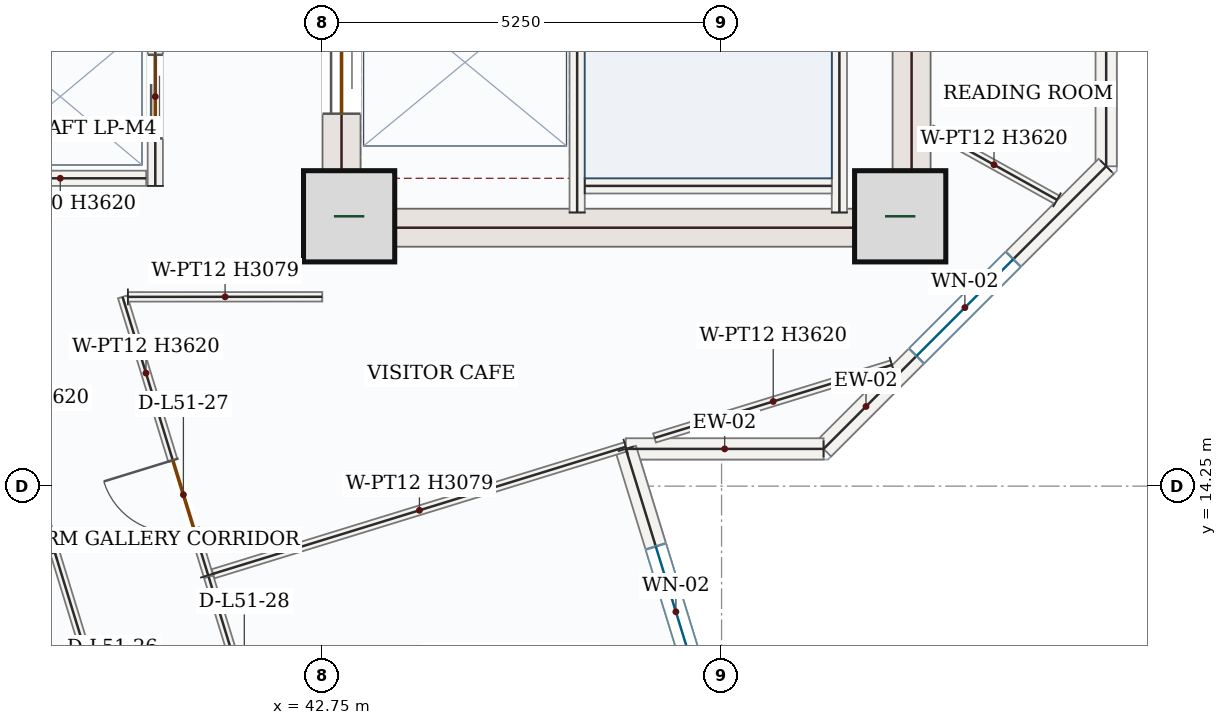
"""IFC4 building model, lengths in metres.
Left out: names, types, materials, properties, quantities, classifications, styles, units other than length and angle.
Written with IfcOpenShell. Run it as: python <this file> out.ifc"""

import sys

from ifc_helpers import new_model, si_unit, direction, frame, frame_2d, origin, origin_2d, place, context, subcontext, project, spatial, rectangle, extrude, source, transform, mapped, element, fill, save


model = new_model("IFC4")
c1 = context("Model", 3, precision=1e-05, world=origin(), true_north=direction((0.0, 1.0)))
c2 = subcontext(c1, "Body", "Model", "MODEL_VIEW")
j1 = project(units=[si_unit("LENGTHUNIT", "METRE"), si_unit("PLANEANGLEUNIT", "RADIAN")], contexts=[c1])
p1 = place(None, origin())
s1 = spatial("IfcSite", under=j1, at=p1, CompositionType="ELEMENT")
p2 = place(p1, origin())
s2 = spatial("IfcBuilding", under=s1, at=p2, CompositionType="ELEMENT")
p3 = place(p2, frame((0.0, 0.0, 217.5)))
s3 = spatial("IfcBuildingStorey", under=s2, at=p3, CompositionType="ELEMENT", Elevation=217.5)
p4 = place(p3, frame((43.0, 17.4, 0.0), z_axis=(0.0, 0.0, 1.0), x_axis=(0.0, 1.0, 0.0)))
e1 = element("IfcWall", 1, at=p4, inside=s3, PredefinedType="SHEAR", context=c2, shape_type="SweptSolid", body=[
    extrude(rectangle(XDim=8.55, YDim=0.5, at=frame_2d((4.275, 0.0))), origin(), (0.0, 0.0, 1.0), 3.62),
])
p5 = place(p4, frame((6.65, 0.0, 0.0)))
e2 = element("IfcOpeningElement", 2, at=p5, cuts=e1, PredefinedType="OPENING", context=c2, shape_type="SweptSolid", body=[
    extrude(rectangle(XDim=1.1, YDim=2.2, at=frame_2d((0.55, 1.1))), frame((0.0, 0.26, 0.0), z_axis=(0.0, -1.0, 0.0), x_axis=(1.0, 0.0, 0.0)), (0.0, 0.0, 1.0), 0.52),
])
p6 = place(p4, frame((1.75, 0.0, 0.0)))
e3 = element("IfcOpeningElement", 3, at=p6, cuts=e1, PredefinedType="OPENING", context=c2, shape_type="SweptSolid", body=[
    extrude(rectangle(XDim=1.3, YDim=2.2, at=frame_2d((0.65, 1.1))), frame((0.0, 0.26, 0.0), z_axis=(0.0, -1.0, 0.0), x_axis=(1.0, 0.0, 0.0)), (0.0, 0.0, 1.0), 0.52),
])
p7 = place(p4, frame((4.55, 0.0, 0.0)))
e4 = element("IfcOpeningElement", 4, at=p7, cuts=e1, PredefinedType="OPENING", context=c2, shape_type="SweptSolid", body=[
    extrude(rectangle(XDim=0.88, YDim=2.1, at=frame_2d((0.44, 1.05))), frame((0.0, 0.26, 0.0), z_axis=(0.0, -1.0, 0.0), x_axis=(1.0, 0.0, 0.0)), (0.0, 0.0, 1.0), 0.52),
])
m1 = source(origin(), c2, "Body", "SweptSolid", [
    extrude(rectangle(XDim=8.55, YDim=0.5, at=frame_2d((4.275, 0.0))), origin(), (0.0, 0.0, 1.0), 3.62),
])
p8 = place(p3, frame((50.5, 17.4, 0.0), z_axis=(0.0, 0.0, 1.0), x_axis=(0.0, 1.0, 0.0)))
e5 = element("IfcWall", 5, at=p8, inside=s3, PredefinedType="SHEAR", context=c2, shape_type="MappedRepresentation", body=[
    mapped(m1, transform((0.0, 0.0, 0.0), x_axis=(1.0, 0.0, 0.0), y_axis=(0.0, 1.0, 0.0), z_axis=(0.0, 0.0, 1.0), scale=1.0)),
])
m2 = source(origin(), c2, "Body", "SweptSolid", [
    extrude(rectangle(XDim=7.0, YDim=0.5, at=frame_2d((3.5, 0.0))), origin(), (0.0, 0.0, 1.0), 3.62),
])
p9 = place(p3, frame((43.25, 17.65, 0.0), z_axis=(0.0, 0.0, 1.0), x_axis=(1.0, 0.0, 0.0)))
e6 = element("IfcWall", 6, at=p9, inside=s3, PredefinedType="SHEAR", context=c2, shape_type="MappedRepresentation", body=[
    mapped(m2, transform((0.0, 0.0, 0.0), x_axis=(1.0, 0.0, 0.0), y_axis=(0.0, 1.0, 0.0), z_axis=(0.0, 0.0, 1.0), scale=1.0)),
])
m3 = source(origin(), c2, "Body", "SweptSolid", [
    extrude(rectangle(XDim=1.2, YDim=1.2, at=origin_2d()), origin(), (0.0, 0.0, 1.0), 3.9),
])
for number, where, z_axis, x_axis in (
    (7, (43.1, 17.8, 0.0), (0.0, 0.0, 1.0), (1.0, 0.0, 0.0)),
    (8, (50.35, 17.8, 0.0), (0.0, 0.0, 1.0), (1.0, 0.0, 0.0)),
):
    element("IfcColumn", number, at=place(p3, frame(where, z_axis=z_axis, x_axis=x_axis)), inside=s3, PredefinedType="COLUMN", context=c2, shape_type="MappedRepresentation", body=[
        mapped(m3, transform((0.0, 0.0, 0.0), x_axis=(1.0, 0.0, 0.0), y_axis=(0.0, 1.0, 0.0), z_axis=(0.0, 0.0, 1.0), scale=1.0)),
    ])
m4 = source(origin(), c2, "Body", "SweptSolid", [
    extrude(rectangle(XDim=6.822, YDim=0.28, at=frame_2d((3.411, 0.0))), origin(), (0.0, 0.0, 1.0), 3.62),
])
p10 = place(p3, frame((53.06, 25.28, 0.0), z_axis=(0.0, 0.0, 1.0), x_axis=(0.0, -1.0, 0.0)))
e9 = element("IfcWall", 9, at=p10, inside=s3, PredefinedType="SOLIDWALL", context=c2, shape_type="MappedRepresentation", body=[
    mapped(m4, transform((0.0, 0.0, 0.0), x_axis=(1.0, 0.0, 0.0), y_axis=(0.0, 1.0, 0.0), z_axis=(0.0, 0.0, 1.0), scale=1.0)),
])
p11 = place(p3, frame((53.06, 18.458, 0.0), z_axis=(0.0, 0.0, 1.0), x_axis=(-0.707106781187, -0.707106781187, 0.0)))
e10 = element("IfcWall", 10, at=p11, inside=s3, PredefinedType="SOLIDWALL", context=c2, shape_type="SweptSolid", body=[
    extrude(rectangle(XDim=5.258, YDim=0.28, at=frame_2d((2.629, 0.0))), origin(), (0.0, 0.0, 1.0), 3.62),
])
p12 = place(p11, frame((1.729, 0.0, 0.85)))
e11 = element("IfcOpeningElement", 11, at=p12, cuts=e10, PredefinedType="OPENING", context=c2, shape_type="SweptSolid", body=[
    extrude(rectangle(XDim=1.8, YDim=1.75, at=frame_2d((0.9, 0.875))), frame((0.0, 0.15, 0.0), z_axis=(0.0, -1.0, 0.0), x_axis=(1.0, 0.0, 0.0)), (0.0, 0.0, 1.0), 0.3),
])
m5 = source(origin(), c2, "Body", "SweptSolid", [
    extrude(rectangle(XDim=2.602, YDim=0.28, at=frame_2d((1.301, 0.0))), origin(), (0.0, 0.0, 1.0), 3.62),
])
p13 = place(p3, frame((49.342, 14.74, 0.0), z_axis=(0.0, 0.0, 1.0), x_axis=(-1.0, 0.0, 0.0)))
e12 = element("IfcWall", 12, at=p13, inside=s3, PredefinedType="SOLIDWALL", context=c2, shape_type="MappedRepresentation", body=[
    mapped(m5, transform((0.0, 0.0, 0.0), x_axis=(1.0, 0.0, 0.0), y_axis=(0.0, 1.0, 0.0), z_axis=(0.0, 0.0, 1.0), scale=1.0)),
])
p14 = place(p3, frame((46.74, 14.74, 0.0), z_axis=(0.0, 0.0, 1.0), x_axis=(0.294009328951, -0.95580254995, 0.0)))
e13 = element("IfcWall", 13, at=p14, inside=s3, PredefinedType="SOLIDWALL", context=c2, shape_type="SweptSolid", body=[
    extrude(rectangle(XDim=4.484, YDim=0.28, at=frame_2d((2.242, 0.0))), origin(), (0.0, 0.0, 1.0), 3.62),
])
p15 = place(p14, frame((1.342, 0.0, 0.85)))
e14 = element("IfcOpeningElement", 14, at=p15, cuts=e13, PredefinedType="OPENING", context=c2, shape_type="SweptSolid", body=[
    extrude(rectangle(XDim=1.8, YDim=1.75, at=frame_2d((0.9, 0.875))), frame((0.0, 0.15, 0.0), z_axis=(0.0, -1.0, 0.0), x_axis=(1.0, 0.0, 0.0)), (0.0, 0.0, 1.0), 0.3),
])
m6 = source(origin(), c2, "Body", "SweptSolid", [
    extrude(rectangle(XDim=7.87, YDim=0.2, at=frame_2d((3.935, 0.0))), origin(), (0.0, 0.0, 1.0), 3.62),
])
p16 = place(p3, frame((49.55, 17.85, 0.0), z_axis=(0.0, 0.0, 1.0), x_axis=(0.0, 1.0, 0.0)))
e15 = element("IfcWall", 15, at=p16, inside=s3, PredefinedType="SOLIDWALL", context=c2, shape_type="MappedRepresentation", body=[
    mapped(m6, transform((0.0, 0.0, 0.0), x_axis=(1.0, 0.0, 0.0), y_axis=(0.0, 1.0, 0.0), z_axis=(0.0, 0.0, 1.0), scale=1.0)),
])
p17 = place(p3, frame((46.1, 17.85, 0.0), z_axis=(0.0, 0.0, 1.0), x_axis=(0.0, 1.0, 0.0)))
e16 = element("IfcWall", 16, at=p17, inside=s3, PredefinedType="SOLIDWALL", context=c2, shape_type="SweptSolid", body=[
    extrude(rectangle(XDim=8.0, YDim=0.2, at=frame_2d((4.0, 0.0))), origin(), (0.0, 0.0, 1.0), 3.62),
])
p18 = place(p17, frame((6.3, 0.0, 0.0)))
e17 = element("IfcOpeningElement", 17, at=p18, cuts=e16, PredefinedType="OPENING", context=c2, shape_type="SweptSolid", body=[
    extrude(rectangle(XDim=1.05, YDim=2.15, at=frame_2d((0.525, 1.075))), frame((0.0, 0.11, 0.0), z_axis=(0.0, -1.0, 0.0), x_axis=(1.0, 0.0, 0.0)), (0.0, 0.0, 1.0), 0.22),
])
m7 = source(origin(), c2, "Body", "SweptSolid", [
    extrude(rectangle(XDim=3.25, YDim=0.2, at=frame_2d((1.625, 0.0))), origin(), (0.0, 0.0, 1.0), 3.62),
])
p19 = place(p3, frame((46.2, 18.2, 0.0), z_axis=(0.0, 0.0, 1.0), x_axis=(1.0, 0.0, 0.0)))
e18 = element("IfcWall", 18, at=p19, inside=s3, PredefinedType="SOLIDWALL", context=c2, shape_type="MappedRepresentation", body=[
    mapped(m7, transform((0.0, 0.0, 0.0), x_axis=(1.0, 0.0, 0.0), y_axis=(0.0, 1.0, 0.0), z_axis=(0.0, 0.0, 1.0), scale=1.0)),
])
p20 = place(p3, frame((40.55, 18.2, 0.0), z_axis=(0.0, 0.0, 1.0), x_axis=(0.0, 1.0, 0.0)))
e19 = element("IfcWall", 19, at=p20, inside=s3, PredefinedType="SOLIDWALL", context=c2, shape_type="SweptSolid", body=[
    extrude(rectangle(XDim=2.35, YDim=0.2, at=frame_2d((1.175, 0.0))), origin(), (0.0, 0.0, 1.0), 3.62),
])
p21 = place(p20, frame((0.625, 0.0, 0.0)))
e20 = element("IfcOpeningElement", 20, at=p21, cuts=e19, PredefinedType="OPENING", context=c2, shape_type="SweptSolid", body=[
    extrude(rectangle(XDim=1.1, YDim=2.15, at=frame_2d((0.55, 1.075))), frame((0.0, 0.11, 0.0), z_axis=(0.0, -1.0, 0.0), x_axis=(1.0, 0.0, 0.0)), (0.0, 0.0, 1.0), 0.22),
])
m8 = source(origin(), c2, "Body", "SweptSolid", [
    extrude(rectangle(XDim=2.26, YDim=0.2, at=frame_2d((1.13, 0.0))), origin(), (0.0, 0.0, 1.0), 3.62),
])
p22 = place(p3, frame((38.17, 18.3, 0.0), z_axis=(0.0, 0.0, 1.0), x_axis=(1.0, 0.0, 0.0)))
e21 = element("IfcWall", 21, at=p22, inside=s3, PredefinedType="SOLIDWALL", context=c2, shape_type="MappedRepresentation", body=[
    mapped(m8, transform((0.0, 0.0, 0.0), x_axis=(1.0, 0.0, 0.0), y_axis=(0.0, 1.0, 0.0), z_axis=(0.0, 0.0, 1.0), scale=1.0)),
])
m9 = source(origin(), c2, "Body", "SweptSolid", [
    extrude(rectangle(XDim=1.898, YDim=0.125, at=frame_2d((0.949, 0.0))), origin(), (0.0, 0.0, 1.0), 3.62),
])
p23 = place(p3, frame((52.414, 18.017, 0.0), z_axis=(0.0, 0.0, 1.0), x_axis=(-0.873799105313, 0.486287079362, 0.0)))
e22 = element("IfcWall", 22, at=p23, inside=s3, PredefinedType="PARTITIONING", context=c2, shape_type="MappedRepresentation", body=[
    mapped(m9, transform((0.0, 0.0, 0.0), x_axis=(1.0, 0.0, 0.0), y_axis=(0.0, 1.0, 0.0), z_axis=(0.0, 0.0, 1.0), scale=1.0)),
])
p24 = place(p3, frame((41.246, 13.077, 0.0), z_axis=(0.0, 0.0, 1.0), x_axis=(-0.294050037582, 0.955790026836, 0.0)))
e23 = element("IfcWall", 23, at=p24, inside=s3, PredefinedType="PARTITIONING", context=c2, shape_type="SweptSolid", body=[
    extrude(rectangle(XDim=3.833, YDim=0.125, at=frame_2d((1.916, 0.0))), origin(), (0.0, 0.0, 1.0), 3.62),
])
p25 = place(p24, frame((0.634, 0.0, 0.0)))
e24 = element("IfcOpeningElement", 24, at=p25, cuts=e23, PredefinedType="OPENING", context=c2, shape_type="SweptSolid", body=[
    extrude(rectangle(XDim=0.95, YDim=2.15, at=frame_2d((0.475, 1.075))), frame((0.0, 0.073, 0.0), z_axis=(0.0, -1.0, 0.0), x_axis=(1.0, 0.0, 0.0)), (0.0, 0.0, 1.0), 0.145),
])
m10 = source(origin(), c2, "Body", "SweptSolid", [
    extrude(rectangle(XDim=2.557, YDim=0.125, at=frame_2d((1.278, 0.0))), origin(), (0.0, 0.0, 1.0), 3.079),
])
p26 = place(p3, frame((40.19, 16.74, 0.0), z_axis=(0.0, 0.0, 1.0), x_axis=(0.999999886036, 0.000477418068, 0.0)))
e25 = element("IfcWall", 25, at=p26, inside=s3, PredefinedType="PARTITIONING", context=c2, shape_type="MappedRepresentation", body=[
    mapped(m10, transform((0.0, 0.0, 0.0), x_axis=(1.0, 0.0, 0.0), y_axis=(0.0, 1.0, 0.0), z_axis=(0.0, 0.0, 1.0), scale=1.0)),
])
m11 = source(origin(), c2, "Body", "SweptSolid", [
    extrude(rectangle(XDim=3.268, YDim=0.125, at=frame_2d((1.634, 0.0))), origin(), (0.0, 0.0, 1.0), 3.62),
])
p27 = place(p3, frame((50.241, 15.844, 0.0), z_axis=(0.0, 0.0, 1.0), x_axis=(-0.955791929964, -0.294043851519, 0.0)))
e26 = element("IfcWall", 26, at=p27, inside=s3, PredefinedType="PARTITIONING", context=c2, shape_type="MappedRepresentation", body=[
    mapped(m11, transform((0.0, 0.0, 0.0), x_axis=(1.0, 0.0, 0.0), y_axis=(0.0, 1.0, 0.0), z_axis=(0.0, 0.0, 1.0), scale=1.0)),
])
m12 = source(origin(), c2, "Body", "SweptSolid", [
    extrude(rectangle(XDim=5.68, YDim=0.125, at=frame_2d((2.84, 0.0))), origin(), (0.0, 0.0, 1.0), 3.079),
])
p28 = place(p3, frame((46.74, 14.767, 0.0), z_axis=(0.0, 0.0, 1.0), x_axis=(-0.955800379324, -0.294016385402, 0.0)))
e27 = element("IfcWall", 27, at=p28, inside=s3, PredefinedType="PARTITIONING", context=c2, shape_type="MappedRepresentation", body=[
    mapped(m12, transform((0.0, 0.0, 0.0), x_axis=(1.0, 0.0, 0.0), y_axis=(0.0, 1.0, 0.0), z_axis=(0.0, 0.0, 1.0), scale=1.0)),
])
m13 = source(origin(), c2, "Body", "SweptSolid", [
    extrude(rectangle(XDim=3.498, YDim=0.125, at=frame_2d((1.749, 0.0))), origin(), (0.0, 0.0, 1.0), 3.62),
])
p29 = place(p3, frame((38.194, 16.74, 0.0), z_axis=(0.0, 0.0, 1.0), x_axis=(0.294012288782, -0.955801639487, 0.0)))
e28 = element("IfcWall", 28, at=p29, inside=s3, PredefinedType="PARTITIONING", context=c2, shape_type="MappedRepresentation", body=[
    mapped(m13, transform((0.0, 0.0, 0.0), x_axis=(1.0, 0.0, 0.0), y_axis=(0.0, 1.0, 0.0), z_axis=(0.0, 0.0, 1.0), scale=1.0)),
])
m14 = source(origin(), c2, "Body", "SweptSolid", [
    extrude(rectangle(XDim=5.595, YDim=0.125, at=frame_2d((2.797, 0.0))), origin(), (0.0, 0.0, 1.0), 3.62),
])
p30 = place(p3, frame((39.222, 13.396, 0.0), z_axis=(0.0, 0.0, 1.0), x_axis=(-0.955787499516, -0.294058252339, 0.0)))
e29 = element("IfcWall", 29, at=p30, inside=s3, PredefinedType="PARTITIONING", context=c2, shape_type="MappedRepresentation", body=[
    mapped(m14, transform((0.0, 0.0, 0.0), x_axis=(1.0, 0.0, 0.0), y_axis=(0.0, 1.0, 0.0), z_axis=(0.0, 0.0, 1.0), scale=1.0)),
])
p31 = place(p3, frame((43.029, 7.28, 0.0), z_axis=(0.0, 0.0, 1.0), x_axis=(-0.294054630952, 0.955788613667, 0.0)))
e30 = element("IfcWall", 30, at=p31, inside=s3, PredefinedType="PARTITIONING", context=c2, shape_type="SweptSolid", body=[
    extrude(rectangle(XDim=6.045, YDim=0.125, at=frame_2d((3.022, 0.0))), origin(), (0.0, 0.0, 1.0), 3.62),
])
p32 = place(p31, frame((3.974, 0.0, 0.0)))
e31 = element("IfcOpeningElement", 31, at=p32, cuts=e30, PredefinedType="OPENING", context=c2, shape_type="SweptSolid", body=[
    extrude(rectangle(XDim=0.95, YDim=2.15, at=frame_2d((0.475, 1.075))), frame((0.0, 0.073, 0.0), z_axis=(0.0, -1.0, 0.0), x_axis=(1.0, 0.0, 0.0)), (0.0, 0.0, 1.0), 0.145),
])
p33 = place(p3, frame((39.229, 13.377, 0.0), z_axis=(0.0, 0.0, 1.0), x_axis=(0.294016682873, -0.955800287818, 0.0)))
e32 = element("IfcWall", 32, at=p33, inside=s3, PredefinedType="PARTITIONING", context=c2, shape_type="SweptSolid", body=[
    extrude(rectangle(XDim=6.945, YDim=0.125, at=frame_2d((3.473, 0.0))), origin(), (0.0, 0.0, 1.0), 3.62),
])
p34 = place(p33, frame((2.098, 0.0, 0.0)))
e33 = element("IfcOpeningElement", 33, at=p34, cuts=e32, PredefinedType="OPENING", context=c2, shape_type="SweptSolid", body=[
    extrude(rectangle(XDim=0.95, YDim=2.15, at=frame_2d((0.475, 1.075))), frame((0.0, 0.073, 0.0), z_axis=(0.0, -1.0, 0.0), x_axis=(1.0, 0.0, 0.0)), (0.0, 0.0, 1.0), 0.145),
])
m15 = source(origin(), c2, "Body", "SweptSolid", [
    extrude(rectangle(XDim=1.8, YDim=1.75, at=frame_2d((0.9, 0.875))), frame((0.0, 0.03, 0.0), z_axis=(0.0, -1.0, 0.0), x_axis=(1.0, 0.0, 0.0)), (0.0, 0.0, 1.0), 0.06),
])
p35 = place(p12, origin())
e34 = element("IfcWindow", 34, at=p35, inside=s3, PartitioningType="DOUBLE_PANEL_VERTICAL", PredefinedType="WINDOW", context=c2, shape_type="MappedRepresentation", body=[
    mapped(m15, transform((0.0, 0.0, 0.0), x_axis=(1.0, 0.0, 0.0), y_axis=(0.0, 1.0, 0.0), z_axis=(0.0, 0.0, 1.0), scale=1.0)),
])
fill(e11, e34)
p36 = place(p15, origin())
e35 = element("IfcWindow", 35, at=p36, inside=s3, PartitioningType="DOUBLE_PANEL_VERTICAL", PredefinedType="WINDOW", context=c2, shape_type="MappedRepresentation", body=[
    mapped(m15, transform((0.0, 0.0, 0.0), x_axis=(1.0, 0.0, 0.0), y_axis=(0.0, 1.0, 0.0), z_axis=(0.0, 0.0, 1.0), scale=1.0)),
])
fill(e14, e35)
m16 = source(origin(), c2, "Body", "SweptSolid", [
    extrude(rectangle(XDim=1.3, YDim=2.2, at=frame_2d((0.65, 1.1))), frame((0.0, 0.025, 0.0), z_axis=(0.0, -1.0, 0.0), x_axis=(1.0, 0.0, 0.0)), (0.0, 0.0, 1.0), 0.05),
])
p37 = place(p6, origin())
e36 = element("IfcDoor", 36, at=p37, inside=s3, OperationType="DOUBLE_DOOR_SLIDING", PredefinedType="DOOR", context=c2, shape_type="MappedRepresentation", body=[
    mapped(m16, transform((0.0, 0.0, 0.0), x_axis=(1.0, 0.0, 0.0), y_axis=(0.0, 1.0, 0.0), z_axis=(0.0, 0.0, 1.0), scale=1.0)),
])
fill(e3, e36)
m17 = source(origin(), c2, "Body", "SweptSolid", [
    extrude(rectangle(XDim=1.1, YDim=2.15, at=frame_2d((0.55, 1.075))), frame((0.0, 0.025, 0.0), z_axis=(0.0, -1.0, 0.0), x_axis=(1.0, 0.0, 0.0)), (0.0, 0.0, 1.0), 0.05),
])
p38 = place(p21, origin())
e37 = element("IfcDoor", 37, at=p38, inside=s3, OperationType="DOUBLE_DOOR_SLIDING", PredefinedType="DOOR", context=c2, shape_type="MappedRepresentation", body=[
    mapped(m17, transform((0.0, 0.0, 0.0), x_axis=(1.0, 0.0, 0.0), y_axis=(0.0, 1.0, 0.0), z_axis=(0.0, 0.0, 1.0), scale=1.0)),
])
fill(e20, e37)
m18 = source(origin(), c2, "Body", "SweptSolid", [
    extrude(rectangle(XDim=0.95, YDim=2.15, at=frame_2d((0.475, 1.075))), frame((0.0, 0.025, 0.0), z_axis=(0.0, -1.0, 0.0), x_axis=(1.0, 0.0, 0.0)), (0.0, 0.0, 1.0), 0.05),
])
p39 = place(p25, origin())
e38 = element("IfcDoor", 38, at=p39, inside=s3, OperationType="SINGLE_SWING_RIGHT", PredefinedType="DOOR", context=c2, shape_type="MappedRepresentation", body=[
    mapped(m18, transform((0.0, 0.0, 0.0), x_axis=(1.0, 0.0, 0.0), y_axis=(0.0, 1.0, 0.0), z_axis=(0.0, 0.0, 1.0), scale=1.0)),
])
fill(e24, e38)
save(model, sys.argv[1])
